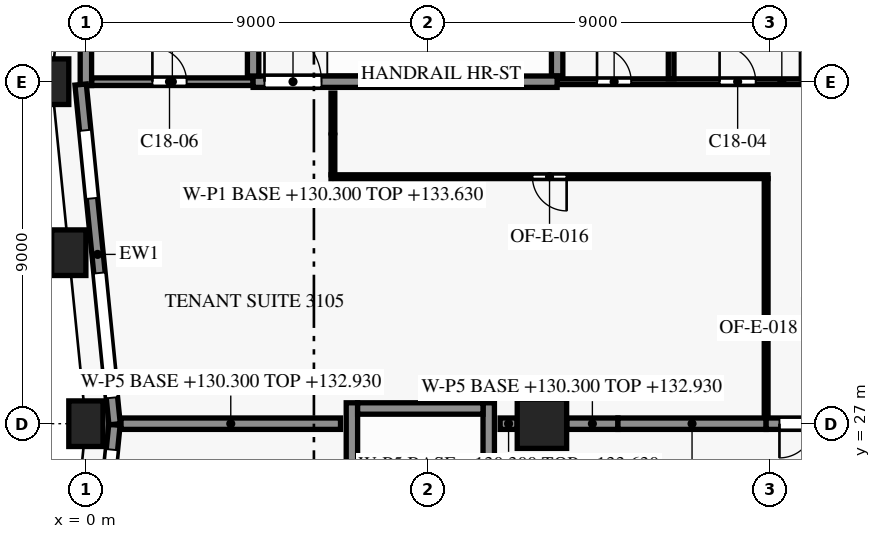
"""IFC4 building model, lengths in metres.
Left out: names, types, materials, properties, quantities, classifications, styles, units other than length and angle.
Written with IfcOpenShell. Run it as: python <this file> out.ifc"""

import sys

from ifc_helpers import new_model, si_unit, direction, frame, frame_2d, origin, origin_2d, place, context, subcontext, project, spatial, rectangle, extrude, element, fill, save


model = new_model("IFC4")
c1 = context("Model", 3, precision=1e-05, world=origin(), true_north=direction((0.0, 1.0)))
c2 = subcontext(c1, "Body", "Model", "MODEL_VIEW")
j1 = project(units=[si_unit("LENGTHUNIT", "METRE"), si_unit("PLANEANGLEUNIT", "RADIAN")], contexts=[c1])
p1 = place(None, origin())
s1 = spatial("IfcSite", under=j1, at=p1, CompositionType="ELEMENT")
p2 = place(p1, origin())
s2 = spatial("IfcBuilding", under=s1, at=p2, CompositionType="ELEMENT")
p3 = place(p2, frame((0.0, 0.0, 130.3)))
s3 = spatial("IfcBuildingStorey", under=s2, at=p3, CompositionType="ELEMENT", Elevation=130.3)
for number, where, z_axis, x_axis in (
    (1, (-0.9, 36.0, 0.0), (0.0, 0.0, 1.0), (0.0, -1.0, 0.0)),
    (2, (-0.45, 31.5, 0.0), (0.0, 0.0, 1.0), (0.1, -0.995, 0.0)),
    (3, (0.0, 27.0, 0.0), (0.0, 0.0, 1.0), (0.0, -1.0, 0.0)),
):
    element("IfcColumn", number, at=place(p3, frame(where, z_axis=z_axis, x_axis=x_axis)), inside=s3, PredefinedType="COLUMN", context=c2, shape_type="SweptSolid", body=[
        extrude(rectangle(XDim=0.9, YDim=1.2, at=origin_2d()), origin(), (0.0, 0.0, 1.0), 3.8),
    ])
p4 = place(p3, frame((12.0, 27.0, 0.0), z_axis=(0.0, 0.0, 1.0), x_axis=(1.0, 0.0, 0.0)))
e4 = element("IfcColumn", 4, at=p4, inside=s3, PredefinedType="COLUMN", context=c2, shape_type="SweptSolid", body=[
    extrude(rectangle(XDim=1.3, YDim=1.3, at=origin_2d()), origin(), (0.0, 0.0, 1.0), 3.8),
])
p5 = place(p3, frame((0.755, 26.985, 0.0), z_axis=(0.0, 0.0, 1.0), x_axis=(-0.099479505633, 0.995039611251, 0.0)))
e5 = element("IfcWall", 5, at=p5, inside=s3, PredefinedType="SOLIDWALL", context=c2, shape_type="SweptSolid", body=[
    extrude(rectangle(XDim=8.985, YDim=0.3, at=frame_2d((4.492, 0.0))), origin(), (0.0, 0.0, 1.0), 3.15),
])
p6 = place(p5, frame((0.701, 0.0, 0.15)))
e6 = element("IfcOpeningElement", 6, at=p6, cuts=e5, PredefinedType="OPENING", context=c2, shape_type="SweptSolid", body=[
    extrude(rectangle(XDim=3.3, YDim=2.4, at=frame_2d((1.65, 1.2))), frame((0.0, 0.16, 0.0), z_axis=(0.0, -1.0, 0.0), x_axis=(1.0, 0.0, 0.0)), (0.0, 0.0, 1.0), 0.32),
])
p7 = place(p5, frame((5.974, 0.0, 0.75)))
e7 = element("IfcOpeningElement", 7, at=p7, cuts=e5, PredefinedType="OPENING", context=c2, shape_type="SweptSolid", body=[
    extrude(rectangle(XDim=1.8, YDim=1.8, at=frame_2d((0.9, 0.9))), frame((0.0, 0.16, 0.0), z_axis=(0.0, -1.0, 0.0), x_axis=(1.0, 0.0, 0.0)), (0.0, 0.0, 1.0), 0.32),
])
p8 = place(p3, frame((-0.148, 17.985, 0.0), z_axis=(0.0, 0.0, 1.0), x_axis=(0.099495688264, 0.995037993253, 0.0)))
e8 = element("IfcWall", 8, at=p8, inside=s3, PredefinedType="SOLIDWALL", context=c2, shape_type="SweptSolid", body=[
    extrude(rectangle(XDim=9.03, YDim=0.3, at=frame_2d((4.515, 0.0))), origin(), (0.0, 0.0, 1.0), 3.15),
])
p9 = place(p8, frame((1.301, 0.0, 0.75)))
e9 = element("IfcOpeningElement", 9, at=p9, cuts=e8, PredefinedType="OPENING", context=c2, shape_type="SweptSolid", body=[
    extrude(rectangle(XDim=1.8, YDim=1.8, at=frame_2d((0.9, 0.9))), frame((0.0, 0.16, 0.0), z_axis=(0.0, -1.0, 0.0), x_axis=(1.0, 0.0, 0.0)), (0.0, 0.0, 1.0), 0.32),
])
p10 = place(p8, frame((5.073, 0.0, 0.15)))
e10 = element("IfcOpeningElement", 10, at=p10, cuts=e8, PredefinedType="OPENING", context=c2, shape_type="SweptSolid", body=[
    extrude(rectangle(XDim=3.3, YDim=2.4, at=frame_2d((1.65, 1.2))), frame((0.0, 0.16, 0.0), z_axis=(0.0, -1.0, 0.0), x_axis=(1.0, 0.0, 0.0)), (0.0, 0.0, 1.0), 0.32),
])
p11 = place(p3, frame((7.15, 27.4, 0.0), z_axis=(0.0, 0.0, 1.0), x_axis=(1.0, 0.0, 0.0)))
e11 = element("IfcWall", 11, at=p11, inside=s3, PredefinedType="SHEAR", context=c2, shape_type="SweptSolid", body=[
    extrude(rectangle(XDim=3.3, YDim=0.3, at=frame_2d((1.65, 0.0))), origin(), (0.0, 0.0, 1.0), 3.5),
])
p12 = place(p3, frame((12.4, 36.0, 0.0), z_axis=(0.0, 0.0, 1.0), x_axis=(1.0, 0.0, 0.0)))
e12 = element("IfcWall", 12, at=p12, inside=s3, PredefinedType="SHEAR", context=c2, shape_type="SweptSolid", body=[
    extrude(rectangle(XDim=11.825, YDim=0.15, at=frame_2d((5.913, 0.0))), origin(), (0.0, 0.0, 1.0), 3.5),
])
p13 = place(p12, frame((1.05, 0.0, 0.0)))
e13 = element("IfcOpeningElement", 13, at=p13, cuts=e12, PredefinedType="OPENING", context=c2, shape_type="SweptSolid", body=[
    extrude(rectangle(XDim=0.9, YDim=2.1, at=frame_2d((0.45, 1.05))), frame((0.0, 0.085, 0.0), z_axis=(0.0, -1.0, 0.0), x_axis=(1.0, 0.0, 0.0)), (0.0, 0.0, 1.0), 0.17),
])
p14 = place(p12, frame((4.275, 0.0, 0.0)))
e14 = element("IfcOpeningElement", 14, at=p14, cuts=e12, PredefinedType="OPENING", context=c2, shape_type="SweptSolid", body=[
    extrude(rectangle(XDim=0.95, YDim=2.1, at=frame_2d((0.475, 1.05))), frame((0.0, 0.085, 0.0), z_axis=(0.0, -1.0, 0.0), x_axis=(1.0, 0.0, 0.0)), (0.0, 0.0, 1.0), 0.17),
])
p15 = place(p12, frame((8.75, 0.0, 0.0)))
e15 = element("IfcOpeningElement", 15, at=p15, cuts=e12, PredefinedType="OPENING", context=c2, shape_type="SweptSolid", body=[
    extrude(rectangle(XDim=0.9, YDim=2.1, at=frame_2d((0.45, 1.05))), frame((0.0, 0.085, 0.0), z_axis=(0.0, -1.0, 0.0), x_axis=(1.0, 0.0, 0.0)), (0.0, 0.0, 1.0), 0.17),
])
p16 = place(p3, frame((0.15, 36.0, 0.0), z_axis=(0.0, 0.0, 1.0), x_axis=(1.0, 0.0, 0.0)))
e16 = element("IfcWall", 16, at=p16, inside=s3, PredefinedType="PARTITIONING", context=c2, shape_type="SweptSolid", body=[
    extrude(rectangle(XDim=4.25, YDim=0.2, at=frame_2d((2.125, 0.0))), origin(), (0.0, 0.0, 1.0), 3.5),
])
p17 = place(p16, frame((1.6, 0.0, 0.0)))
e17 = element("IfcOpeningElement", 17, at=p17, cuts=e16, PredefinedType="OPENING", context=c2, shape_type="SweptSolid", body=[
    extrude(rectangle(XDim=0.9, YDim=2.1, at=frame_2d((0.45, 1.05))), frame((0.0, 0.11, 0.0), z_axis=(0.0, -1.0, 0.0), x_axis=(1.0, 0.0, 0.0)), (0.0, 0.0, 1.0), 0.22),
])
p18 = place(p3, frame((4.4, 36.0, 0.0), z_axis=(0.0, 0.0, 1.0), x_axis=(1.0, 0.0, 0.0)))
e18 = element("IfcWall", 18, at=p18, inside=s3, PredefinedType="SHEAR", context=c2, shape_type="SweptSolid", body=[
    extrude(rectangle(XDim=8.0, YDim=0.3, at=frame_2d((4.0, 0.0))), origin(), (0.0, 0.0, 1.0), 3.5),
])
p19 = place(p18, frame((0.3, 0.0, 0.0)))
e19 = element("IfcOpeningElement", 19, at=p19, cuts=e18, PredefinedType="OPENING", context=c2, shape_type="SweptSolid", body=[
    extrude(rectangle(XDim=1.5, YDim=2.2, at=frame_2d((0.75, 1.1))), frame((0.0, 0.16, 0.0), z_axis=(0.0, -1.0, 0.0), x_axis=(1.0, 0.0, 0.0)), (0.0, 0.0, 1.0), 0.32),
])
p20 = place(p3, frame((0.0, 35.9, 0.0), z_axis=(0.0, 0.0, 1.0), x_axis=(0.0, 1.0, 0.0)))
e20 = element("IfcWall", 20, at=p20, inside=s3, PredefinedType="SHEAR", context=c2, shape_type="SweptSolid", body=[
    extrude(rectangle(XDim=7.375, YDim=0.3, at=frame_2d((3.688, 0.0))), origin(), (0.0, 0.0, 1.0), 3.5),
])
p21 = place(p3, frame((4.4, 36.15, 0.0), z_axis=(0.0, 0.0, 1.0), x_axis=(0.0, 1.0, 0.0)))
e21 = element("IfcWall", 21, at=p21, inside=s3, PredefinedType="SHEAR", context=c2, shape_type="SweptSolid", body=[
    extrude(rectangle(XDim=3.45, YDim=0.3, at=frame_2d((1.725, 0.0))), origin(), (0.0, 0.0, 1.0), 3.5),
])
p22 = place(p3, frame((7.0, 19.25, 0.0), z_axis=(0.0, 0.0, 1.0), x_axis=(0.0, 1.0, 0.0)))
e22 = element("IfcWall", 22, at=p22, inside=s3, PredefinedType="SHEAR", context=c2, shape_type="SweptSolid", body=[
    extrude(rectangle(XDim=8.3, YDim=0.3, at=frame_2d((4.15, 0.0))), origin(), (0.0, 0.0, 1.0), 3.5),
])
p23 = place(p3, frame((10.6, 19.25, 0.0), z_axis=(0.0, 0.0, 1.0), x_axis=(0.0, 1.0, 0.0)))
e23 = element("IfcWall", 23, at=p23, inside=s3, PredefinedType="SHEAR", context=c2, shape_type="SweptSolid", body=[
    extrude(rectangle(XDim=8.3, YDim=0.3, at=frame_2d((4.15, 0.0))), origin(), (0.0, 0.0, 1.0), 3.5),
])
p24 = place(p23, frame((0.55, 0.0, 0.0)))
e24 = element("IfcOpeningElement", 24, at=p24, cuts=e23, PredefinedType="OPENING", context=c2, shape_type="SweptSolid", body=[
    extrude(rectangle(XDim=1.2, YDim=2.2, at=frame_2d((0.6, 1.1))), frame((0.0, 0.16, 0.0), z_axis=(0.0, -1.0, 0.0), x_axis=(1.0, 0.0, 0.0)), (0.0, 0.0, 1.0), 0.32),
])
p25 = place(p3, frame((12.4, 36.15, 0.0), z_axis=(0.0, 0.0, 1.0), x_axis=(0.0, 1.0, 0.0)))
e25 = element("IfcWall", 25, at=p25, inside=s3, PredefinedType="SHEAR", context=c2, shape_type="SweptSolid", body=[
    extrude(rectangle(XDim=3.725, YDim=0.3, at=frame_2d((1.863, 0.0))), origin(), (0.0, 0.0, 1.0), 3.5),
])
p26 = place(p3, frame((15.4, 36.075, 0.0), z_axis=(0.0, 0.0, 1.0), x_axis=(0.0, 1.0, 0.0)))
e26 = element("IfcWall", 26, at=p26, inside=s3, PredefinedType="PARTITIONING", context=c2, shape_type="SweptSolid", body=[
    extrude(rectangle(XDim=3.8, YDim=0.15, at=frame_2d((1.9, 0.0))), origin(), (0.0, 0.0, 1.0), 3.5),
])
p27 = place(p3, frame((0.925, 27.0, 0.0), z_axis=(0.0, 0.0, 1.0), x_axis=(1.0, 0.0, 0.0)))
e27 = element("IfcWall", 27, at=p27, inside=s3, PredefinedType="PARTITIONING", context=c2, shape_type="SweptSolid", body=[
    extrude(rectangle(XDim=5.775, YDim=0.3, at=frame_2d((2.888, 0.0))), origin(), (0.0, 0.0, 1.0), 2.63),
])
p28 = place(p3, frame((10.9, 27.0, 0.0), z_axis=(0.0, 0.0, 1.0), x_axis=(1.0, 0.0, 0.0)))
e28 = element("IfcWall", 28, at=p28, inside=s3, PredefinedType="PARTITIONING", context=c2, shape_type="SweptSolid", body=[
    extrude(rectangle(XDim=0.445, YDim=0.3, at=frame_2d((0.223, 0.0))), origin(), (0.0, 0.0, 1.0), 3.33),
])
p29 = place(p3, frame((12.655, 27.0, 0.0), z_axis=(0.0, 0.0, 1.0), x_axis=(1.0, 0.0, 0.0)))
e29 = element("IfcWall", 29, at=p29, inside=s3, PredefinedType="PARTITIONING", context=c2, shape_type="SweptSolid", body=[
    extrude(rectangle(XDim=1.345, YDim=0.3, at=frame_2d((0.672, 0.0))), origin(), (0.0, 0.0, 1.0), 2.63),
])
p30 = place(p3, frame((14.0, 27.0, 0.0), z_axis=(0.0, 0.0, 1.0), x_axis=(1.0, 0.0, 0.0)))
e30 = element("IfcWall", 30, at=p30, inside=s3, PredefinedType="PARTITIONING", context=c2, shape_type="SweptSolid", body=[
    extrude(rectangle(XDim=3.9, YDim=0.3, at=frame_2d((1.95, 0.0))), origin(), (0.0, 0.0, 1.0), 2.63),
])
p31 = place(p3, frame((20.4, 27.0, 0.0), z_axis=(0.0, 0.0, 1.0), x_axis=(-1.0, 0.0, 0.0)))
e31 = element("IfcWall", 31, at=p31, inside=s3, PredefinedType="PARTITIONING", context=c2, shape_type="SweptSolid", body=[
    extrude(rectangle(XDim=2.5, YDim=0.3, at=frame_2d((1.25, 0.0))), origin(), (0.0, 0.0, 1.0), 2.63),
])
p32 = place(p31, frame((0.35, 0.0, 0.0)))
e32 = element("IfcOpeningElement", 32, at=p32, cuts=e31, PredefinedType="OPENING", context=c2, shape_type="SweptSolid", body=[
    extrude(rectangle(XDim=1.8, YDim=2.1, at=frame_2d((0.9, 1.05))), frame((0.0, 0.16, 0.0), z_axis=(0.0, -1.0, 0.0), x_axis=(1.0, 0.0, 0.0)), (0.0, 0.0, 1.0), 0.32),
])
p33 = place(p3, frame((17.9, 27.17, 0.0), z_axis=(0.0, 0.0, 1.0), x_axis=(0.0, 1.0, 0.0)))
e33 = element("IfcWall", 33, at=p33, inside=s3, PredefinedType="PARTITIONING", context=c2, shape_type="SweptSolid", body=[
    extrude(rectangle(XDim=6.28, YDim=0.1, at=frame_2d((3.14, 0.0))), origin(), (0.0, 0.0, 1.0), 2.63),
])
p34 = place(p3, frame((17.95, 33.5, 0.0), z_axis=(0.0, 0.0, 1.0), x_axis=(-1.0, 0.0, 0.0)))
e34 = element("IfcWall", 34, at=p34, inside=s3, PredefinedType="PARTITIONING", context=c2, shape_type="SweptSolid", body=[
    extrude(rectangle(XDim=11.5, YDim=0.1, at=frame_2d((5.75, 0.0))), origin(), (0.0, 0.0, 1.0), 2.63),
])
p35 = place(p34, frame((5.3, 0.0, 0.0)))
e35 = element("IfcOpeningElement", 35, at=p35, cuts=e34, PredefinedType="OPENING", context=c2, shape_type="SweptSolid", body=[
    extrude(rectangle(XDim=0.9, YDim=2.1, at=frame_2d((0.45, 1.05))), frame((0.0, 0.06, 0.0), z_axis=(0.0, -1.0, 0.0), x_axis=(1.0, 0.0, 0.0)), (0.0, 0.0, 1.0), 0.12),
])
p36 = place(p3, frame((6.5, 33.55, 0.0), z_axis=(0.0, 0.0, 1.0), x_axis=(0.0, 1.0, 0.0)))
e36 = element("IfcWall", 36, at=p36, inside=s3, PredefinedType="PARTITIONING", context=c2, shape_type="SweptSolid", body=[
    extrude(rectangle(XDim=2.15, YDim=0.1, at=frame_2d((1.075, 0.0))), origin(), (0.0, 0.0, 1.0), 3.33),
])
p37 = place(p6, origin())
e37 = element("IfcWindow", 37, at=p37, inside=s3, PartitioningType="SINGLE_PANEL", PredefinedType="WINDOW", context=c2, shape_type="SweptSolid", body=[
    extrude(rectangle(XDim=3.3, YDim=2.4, at=frame_2d((1.65, 1.2))), frame((0.0, 0.03, 0.0), z_axis=(0.0, -1.0, 0.0), x_axis=(1.0, 0.0, 0.0)), (0.0, 0.0, 1.0), 0.06),
])
fill(e6, e37)
p38 = place(p7, origin())
e38 = element("IfcWindow", 38, at=p38, inside=s3, PartitioningType="SINGLE_PANEL", PredefinedType="WINDOW", context=c2, shape_type="SweptSolid", body=[
    extrude(rectangle(XDim=1.8, YDim=1.8, at=frame_2d((0.9, 0.9))), frame((0.0, 0.03, 0.0), z_axis=(0.0, -1.0, 0.0), x_axis=(1.0, 0.0, 0.0)), (0.0, 0.0, 1.0), 0.06),
])
fill(e7, e38)
p39 = place(p10, origin())
e39 = element("IfcWindow", 39, at=p39, inside=s3, PartitioningType="SINGLE_PANEL", PredefinedType="WINDOW", context=c2, shape_type="SweptSolid", body=[
    extrude(rectangle(XDim=3.3, YDim=2.4, at=frame_2d((1.65, 1.2))), frame((0.0, 0.03, 0.0), z_axis=(0.0, -1.0, 0.0), x_axis=(1.0, 0.0, 0.0)), (0.0, 0.0, 1.0), 0.06),
])
fill(e10, e39)
p40 = place(p13, origin())
e40 = element("IfcDoor", 40, at=p40, inside=s3, OperationType="SINGLE_SWING_RIGHT", PredefinedType="DOOR", context=c2, shape_type="SweptSolid", body=[
    extrude(rectangle(XDim=0.9, YDim=2.1, at=frame_2d((0.45, 1.05))), frame((0.0, 0.025, 0.0), z_axis=(0.0, -1.0, 0.0), x_axis=(1.0, 0.0, 0.0)), (0.0, 0.0, 1.0), 0.05),
])
fill(e13, e40)
p41 = place(p14, origin())
e41 = element("IfcDoor", 41, at=p41, inside=s3, OperationType="SINGLE_SWING_LEFT", PredefinedType="DOOR", context=c2, shape_type="SweptSolid", body=[
    extrude(rectangle(XDim=0.95, YDim=2.1, at=frame_2d((0.475, 1.05))), frame((0.0, 0.025, 0.0), z_axis=(0.0, -1.0, 0.0), x_axis=(1.0, 0.0, 0.0)), (0.0, 0.0, 1.0), 0.05),
])
fill(e14, e41)
p42 = place(p17, origin())
e42 = element("IfcDoor", 42, at=p42, inside=s3, OperationType="SINGLE_SWING_LEFT", PredefinedType="DOOR", context=c2, shape_type="SweptSolid", body=[
    extrude(rectangle(XDim=0.9, YDim=2.1, at=frame_2d((0.45, 1.05))), frame((0.0, 0.025, 0.0), z_axis=(0.0, -1.0, 0.0), x_axis=(1.0, 0.0, 0.0)), (0.0, 0.0, 1.0), 0.05),
])
fill(e17, e42)
p43 = place(p19, origin())
e43 = element("IfcDoor", 43, at=p43, inside=s3, OperationType="SINGLE_SWING_RIGHT", PredefinedType="DOOR", context=c2, shape_type="SweptSolid", body=[
    extrude(rectangle(XDim=1.5, YDim=2.2, at=frame_2d((0.75, 1.1))), frame((0.0, 0.025, 0.0), z_axis=(0.0, -1.0, 0.0), x_axis=(1.0, 0.0, 0.0)), (0.0, 0.0, 1.0), 0.05),
])
fill(e19, e43)
p44 = place(p35, origin())
e44 = element("IfcDoor", 44, at=p44, inside=s3, OperationType="SINGLE_SWING_LEFT", PredefinedType="DOOR", context=c2, shape_type="SweptSolid", body=[
    extrude(rectangle(XDim=0.9, YDim=2.1, at=frame_2d((0.45, 1.05))), frame((0.0, 0.025, 0.0), z_axis=(0.0, -1.0, 0.0), x_axis=(1.0, 0.0, 0.0)), (0.0, 0.0, 1.0), 0.05),
])
fill(e35, e44)
p45 = place(p32, origin())
e45 = element("IfcDoor", 45, at=p45, inside=s3, OperationType="DOUBLE_DOOR_SINGLE_SWING", PredefinedType="DOOR", context=c2, shape_type="SweptSolid", body=[
    extrude(rectangle(XDim=1.8, YDim=2.1, at=frame_2d((0.9, 1.05))), frame((0.0, 0.025, 0.0), z_axis=(0.0, -1.0, 0.0), x_axis=(1.0, 0.0, 0.0)), (0.0, 0.0, 1.0), 0.05),
])
fill(e32, e45)
save(model, sys.argv[1])
